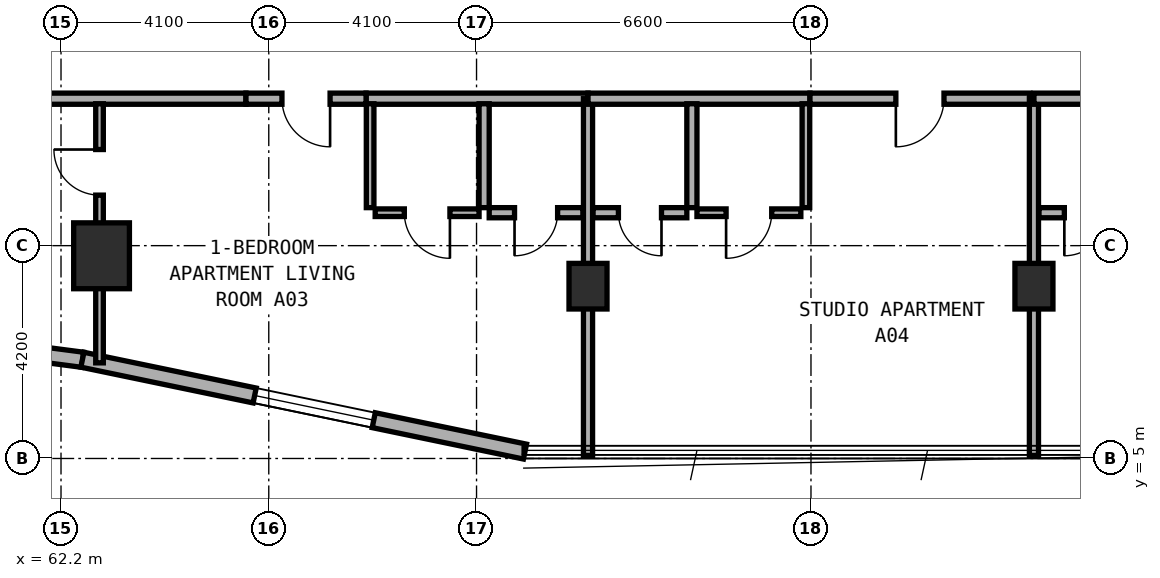
"""IFC4 building model, lengths in metres.
Left out: names, types, materials, properties, quantities, classifications, styles, units other than length and angle.
Written with IfcOpenShell. Run it as: python <this file> out.ifc"""

import sys

from ifc_helpers import new_model, si_unit, direction, frame, frame_2d, origin, origin_2d, place, context, subcontext, project, spatial, rectangle, extrude, element, fill, save


model = new_model("IFC4")
c1 = context("Model", 3, precision=1e-05, world=origin(), true_north=direction((0.0, 1.0)))
c2 = subcontext(c1, "Body", "Model", "MODEL_VIEW")
j1 = project(units=[si_unit("LENGTHUNIT", "METRE"), si_unit("PLANEANGLEUNIT", "RADIAN")], contexts=[c1])
p1 = place(None, origin())
s1 = spatial("IfcSite", under=j1, at=p1, CompositionType="ELEMENT")
p2 = place(p1, origin())
s2 = spatial("IfcBuilding", under=s1, at=p2, CompositionType="ELEMENT")
p3 = place(p2, frame((0.0, 0.0, 52.0)))
s3 = spatial("IfcBuildingStorey", under=s2, at=p3, CompositionType="ELEMENT", Elevation=52.0)
for number, where, z_axis, x_axis in (
    (1, (72.6, 8.4, 0.0), (0.0, 0.0, 1.0), (1.0, 0.0, 0.0)),
    (2, (81.4, 8.4, 0.0), (0.0, 0.0, 1.0), (1.0, 0.0, 0.0)),
):
    element("IfcColumn", number, at=place(p3, frame(where, z_axis=z_axis, x_axis=x_axis)), inside=s3, PredefinedType="COLUMN", context=c2, shape_type="SweptSolid", body=[
        extrude(rectangle(XDim=0.75, YDim=0.9, at=origin_2d()), origin(), (0.0, 0.0, 1.0), 3.5),
    ])
p4 = place(p3, frame((63.0, 9.0, 0.0), z_axis=(0.0, 0.0, 1.0), x_axis=(1.0, 0.0, 0.0)))
e3 = element("IfcColumn", 3, at=p4, inside=s3, PredefinedType="COLUMN", context=c2, shape_type="SweptSolid", body=[
    extrude(rectangle(XDim=1.1, YDim=1.3, at=origin_2d()), origin(), (0.0, 0.0, 1.0), 3.5),
])
p5 = place(p3, frame((61.869, 7.047, 0.0), z_axis=(0.0, 0.0, 1.0), x_axis=(0.991559404866, -0.129653178221, 0.0)))
e4 = element("IfcWall", 4, at=p5, inside=s3, PredefinedType="STANDARD", context=c2, shape_type="SweptSolid", body=[
    extrude(rectangle(XDim=0.764, YDim=0.3, at=frame_2d((0.382, 0.0))), origin(), (0.0, 0.0, 1.0), 3.25),
])
p6 = place(p3, frame((62.622, 6.949, 0.0), z_axis=(0.0, 0.0, 1.0), x_axis=(0.979127260729, -0.203248142175, 0.0)))
e5 = element("IfcWall", 5, at=p6, inside=s3, PredefinedType="STANDARD", context=c2, shape_type="SweptSolid", body=[
    extrude(rectangle(XDim=8.92, YDim=0.3, at=frame_2d((4.46, 0.0))), origin(), (0.0, 0.0, 1.0), 3.25),
])
p7 = place(p6, frame((3.472, 0.0, 0.8)))
e6 = element("IfcOpeningElement", 6, at=p7, cuts=e5, PredefinedType="OPENING", context=c2, shape_type="SweptSolid", body=[
    extrude(rectangle(XDim=2.4, YDim=1.6, at=frame_2d((1.2, 0.8))), frame((0.0, 0.16, 0.0), z_axis=(0.0, -1.0, 0.0), x_axis=(1.0, 0.0, 0.0)), (0.0, 0.0, 1.0), 0.32),
])
p8 = place(p3, frame((58.16, 12.1, 0.0), z_axis=(0.0, 0.0, 1.0), x_axis=(1.0, 0.0, 0.0)))
e7 = element("IfcWall", 7, at=p8, inside=s3, PredefinedType="SOLIDWALL", context=c2, shape_type="SweptSolid", body=[
    extrude(rectangle(XDim=7.69, YDim=0.22, at=frame_2d((3.845, 0.0))), origin(), (0.0, 0.0, 1.0), 2.865),
])
p9 = place(p3, frame((68.22, 12.1, 0.0), z_axis=(0.0, 0.0, 1.0), x_axis=(1.0, 0.0, 0.0)))
e8 = element("IfcWall", 8, at=p9, inside=s3, PredefinedType="SOLIDWALL", context=c2, shape_type="SweptSolid", body=[
    extrude(rectangle(XDim=4.38, YDim=0.22, at=frame_2d((2.19, 0.0))), origin(), (0.0, 0.0, 1.0), 2.725),
])
p10 = place(p3, frame((65.85, 12.1, 0.0), z_axis=(0.0, 0.0, 1.0), x_axis=(1.0, 0.0, 0.0)))
e9 = element("IfcWall", 9, at=p10, inside=s3, PredefinedType="SOLIDWALL", context=c2, shape_type="SweptSolid", body=[
    extrude(rectangle(XDim=2.37, YDim=0.22, at=frame_2d((1.185, 0.0))), origin(), (0.0, 0.0, 1.0), 3.22),
])
p11 = place(p10, frame((0.71, 0.0, 0.0)))
e10 = element("IfcOpeningElement", 10, at=p11, cuts=e9, PredefinedType="OPENING", context=c2, shape_type="SweptSolid", body=[
    extrude(rectangle(XDim=0.95, YDim=2.1, at=frame_2d((0.475, 1.05))), frame((0.0, 0.12, 0.0), z_axis=(0.0, -1.0, 0.0), x_axis=(1.0, 0.0, 0.0)), (0.0, 0.0, 1.0), 0.24),
])
p12 = place(p3, frame((62.96, 6.887, 0.0), z_axis=(0.0, 0.0, 1.0), x_axis=(0.0, 1.0, 0.0)))
e11 = element("IfcWall", 11, at=p12, inside=s3, PredefinedType="PARTITIONING", context=c2, shape_type="SweptSolid", body=[
    extrude(rectangle(XDim=5.113, YDim=0.15, at=frame_2d((2.557, 0.0))), origin(), (0.0, 0.0, 1.0), 2.865),
])
p13 = place(p12, frame((3.31, 0.0, 0.0)))
e12 = element("IfcOpeningElement", 12, at=p13, cuts=e11, PredefinedType="OPENING", context=c2, shape_type="SweptSolid", body=[
    extrude(rectangle(XDim=0.9, YDim=2.1, at=frame_2d((0.45, 1.05))), frame((0.0, 0.085, 0.0), z_axis=(0.0, -1.0, 0.0), x_axis=(1.0, 0.0, 0.0)), (0.0, 0.0, 1.0), 0.17),
])
p14 = place(p3, frame((70.55, 9.95, 0.0), z_axis=(0.0, 0.0, 1.0), x_axis=(0.0, 1.0, 0.0)))
e13 = element("IfcWall", 13, at=p14, inside=s3, PredefinedType="PLUMBINGWALL", context=c2, shape_type="SweptSolid", body=[
    extrude(rectangle(XDim=2.05, YDim=0.2, at=frame_2d((1.025, 0.0))), origin(), (0.0, 0.0, 1.0), 3.22),
])
p15 = place(p3, frame((68.3, 9.95, 0.0), z_axis=(0.0, 0.0, 1.0), x_axis=(0.0, 1.0, 0.0)))
e14 = element("IfcWall", 14, at=p15, inside=s3, PredefinedType="PARTITIONING", context=c2, shape_type="SweptSolid", body=[
    extrude(rectangle(XDim=2.05, YDim=0.15, at=frame_2d((1.025, 0.0))), origin(), (0.0, 0.0, 1.0), 3.22),
])
p16 = place(p3, frame((70.65, 9.85, 0.0), z_axis=(0.0, 0.0, 1.0), x_axis=(1.0, 0.0, 0.0)))
e15 = element("IfcWall", 15, at=p16, inside=s3, PredefinedType="PLUMBINGWALL", context=c2, shape_type="SweptSolid", body=[
    extrude(rectangle(XDim=1.85, YDim=0.2, at=frame_2d((0.925, 0.0))), origin(), (0.0, 0.0, 1.0), 3.22),
])
p17 = place(p16, frame((0.5, 0.0, 0.0)))
e16 = element("IfcOpeningElement", 16, at=p17, cuts=e15, PredefinedType="OPENING", context=c2, shape_type="SweptSolid", body=[
    extrude(rectangle(XDim=0.85, YDim=2.1, at=frame_2d((0.425, 1.05))), frame((0.0, 0.11, 0.0), z_axis=(0.0, -1.0, 0.0), x_axis=(1.0, 0.0, 0.0)), (0.0, 0.0, 1.0), 0.22),
])
p18 = place(p3, frame((68.4, 9.85, 0.0), z_axis=(0.0, 0.0, 1.0), x_axis=(1.0, 0.0, 0.0)))
e17 = element("IfcWall", 17, at=p18, inside=s3, PredefinedType="PARTITIONING", context=c2, shape_type="SweptSolid", body=[
    extrude(rectangle(XDim=2.05, YDim=0.15, at=frame_2d((1.025, 0.0))), origin(), (0.0, 0.0, 1.0), 3.22),
])
p19 = place(p18, frame((0.575, 0.0, 0.0)))
e18 = element("IfcOpeningElement", 18, at=p19, cuts=e17, PredefinedType="OPENING", context=c2, shape_type="SweptSolid", body=[
    extrude(rectangle(XDim=0.9, YDim=2.1, at=frame_2d((0.45, 1.05))), frame((0.0, 0.085, 0.0), z_axis=(0.0, -1.0, 0.0), x_axis=(1.0, 0.0, 0.0)), (0.0, 0.0, 1.0), 0.17),
])
p20 = place(p3, frame((72.6, 5.06, 0.0), z_axis=(0.0, 0.0, 1.0), x_axis=(0.0, 1.0, 0.0)))
e19 = element("IfcWall", 19, at=p20, inside=s3, PredefinedType="SOLIDWALL", context=c2, shape_type="SweptSolid", body=[
    extrude(rectangle(XDim=7.04, YDim=0.18, at=frame_2d((3.52, 0.0))), origin(), (0.0, 0.0, 1.0), 2.725),
])
p21 = place(p3, frame((72.6, 12.1, 0.0), z_axis=(0.0, 0.0, 1.0), x_axis=(1.0, 0.0, 0.0)))
e20 = element("IfcWall", 20, at=p21, inside=s3, PredefinedType="SOLIDWALL", context=c2, shape_type="SweptSolid", body=[
    extrude(rectangle(XDim=4.38, YDim=0.22, at=frame_2d((2.19, 0.0))), origin(), (0.0, 0.0, 1.0), 2.725),
])
p22 = place(p3, frame((76.98, 12.1, 0.0), z_axis=(0.0, 0.0, 1.0), x_axis=(1.0, 0.0, 0.0)))
e21 = element("IfcWall", 21, at=p22, inside=s3, PredefinedType="SOLIDWALL", context=c2, shape_type="SweptSolid", body=[
    extrude(rectangle(XDim=4.34, YDim=0.22, at=frame_2d((2.17, 0.0))), origin(), (0.0, 0.0, 1.0), 2.725),
])
p23 = place(p22, frame((1.695, 0.0, 0.0)))
e22 = element("IfcOpeningElement", 22, at=p23, cuts=e21, PredefinedType="OPENING", context=c2, shape_type="SweptSolid", body=[
    extrude(rectangle(XDim=0.95, YDim=2.1, at=frame_2d((0.475, 1.05))), frame((0.0, 0.12, 0.0), z_axis=(0.0, -1.0, 0.0), x_axis=(1.0, 0.0, 0.0)), (0.0, 0.0, 1.0), 0.24),
])
p24 = place(p3, frame((74.65, 9.95, 0.0), z_axis=(0.0, 0.0, 1.0), x_axis=(0.0, 1.0, 0.0)))
e23 = element("IfcWall", 23, at=p24, inside=s3, PredefinedType="PLUMBINGWALL", context=c2, shape_type="SweptSolid", body=[
    extrude(rectangle(XDim=2.05, YDim=0.2, at=frame_2d((1.025, 0.0))), origin(), (0.0, 0.0, 1.0), 2.775),
])
p25 = place(p3, frame((76.9, 9.95, 0.0), z_axis=(0.0, 0.0, 1.0), x_axis=(0.0, 1.0, 0.0)))
e24 = element("IfcWall", 24, at=p25, inside=s3, PredefinedType="PARTITIONING", context=c2, shape_type="SweptSolid", body=[
    extrude(rectangle(XDim=2.05, YDim=0.15, at=frame_2d((1.025, 0.0))), origin(), (0.0, 0.0, 1.0), 2.775),
])
p26 = place(p3, frame((72.7, 9.85, 0.0), z_axis=(0.0, 0.0, 1.0), x_axis=(1.0, 0.0, 0.0)))
e25 = element("IfcWall", 25, at=p26, inside=s3, PredefinedType="PLUMBINGWALL", context=c2, shape_type="SweptSolid", body=[
    extrude(rectangle(XDim=1.85, YDim=0.2, at=frame_2d((0.925, 0.0))), origin(), (0.0, 0.0, 1.0), 3.22),
])
p27 = place(p26, frame((0.5, 0.0, 0.0)))
e26 = element("IfcOpeningElement", 26, at=p27, cuts=e25, PredefinedType="OPENING", context=c2, shape_type="SweptSolid", body=[
    extrude(rectangle(XDim=0.85, YDim=2.1, at=frame_2d((0.425, 1.05))), frame((0.0, 0.11, 0.0), z_axis=(0.0, -1.0, 0.0), x_axis=(1.0, 0.0, 0.0)), (0.0, 0.0, 1.0), 0.22),
])
p28 = place(p3, frame((74.75, 9.85, 0.0), z_axis=(0.0, 0.0, 1.0), x_axis=(1.0, 0.0, 0.0)))
e27 = element("IfcWall", 27, at=p28, inside=s3, PredefinedType="PARTITIONING", context=c2, shape_type="SweptSolid", body=[
    extrude(rectangle(XDim=2.05, YDim=0.15, at=frame_2d((1.025, 0.0))), origin(), (0.0, 0.0, 1.0), 3.22),
])
p29 = place(p28, frame((0.575, 0.0, 0.0)))
e28 = element("IfcOpeningElement", 28, at=p29, cuts=e27, PredefinedType="OPENING", context=c2, shape_type="SweptSolid", body=[
    extrude(rectangle(XDim=0.9, YDim=2.1, at=frame_2d((0.45, 1.05))), frame((0.0, 0.085, 0.0), z_axis=(0.0, -1.0, 0.0), x_axis=(1.0, 0.0, 0.0)), (0.0, 0.0, 1.0), 0.17),
])
p30 = place(p3, frame((81.4, 5.06, 0.0), z_axis=(0.0, 0.0, 1.0), x_axis=(0.0, 1.0, 0.0)))
e29 = element("IfcWall", 29, at=p30, inside=s3, PredefinedType="SOLIDWALL", context=c2, shape_type="SweptSolid", body=[
    extrude(rectangle(XDim=7.04, YDim=0.18, at=frame_2d((3.52, 0.0))), origin(), (0.0, 0.0, 1.0), 2.725),
])
p31 = place(p3, frame((81.4, 12.1, 0.0), z_axis=(0.0, 0.0, 1.0), x_axis=(1.0, 0.0, 0.0)))
e30 = element("IfcWall", 30, at=p31, inside=s3, PredefinedType="SOLIDWALL", context=c2, shape_type="SweptSolid", body=[
    extrude(rectangle(XDim=4.38, YDim=0.22, at=frame_2d((2.19, 0.0))), origin(), (0.0, 0.0, 1.0), 2.725),
])
p32 = place(p3, frame((81.5, 9.85, 0.0), z_axis=(0.0, 0.0, 1.0), x_axis=(1.0, 0.0, 0.0)))
e31 = element("IfcWall", 31, at=p32, inside=s3, PredefinedType="PLUMBINGWALL", context=c2, shape_type="SweptSolid", body=[
    extrude(rectangle(XDim=1.85, YDim=0.2, at=frame_2d((0.925, 0.0))), origin(), (0.0, 0.0, 1.0), 2.725),
])
p33 = place(p32, frame((0.5, 0.0, 0.0)))
e32 = element("IfcOpeningElement", 32, at=p33, cuts=e31, PredefinedType="OPENING", context=c2, shape_type="SweptSolid", body=[
    extrude(rectangle(XDim=0.85, YDim=2.1, at=frame_2d((0.425, 1.05))), frame((0.0, 0.11, 0.0), z_axis=(0.0, -1.0, 0.0), x_axis=(1.0, 0.0, 0.0)), (0.0, 0.0, 1.0), 0.22),
])
p34 = place(p7, origin())
e33 = element("IfcWindow", 33, at=p34, inside=s3, PartitioningType="SINGLE_PANEL", PredefinedType="WINDOW", context=c2, shape_type="SweptSolid", body=[
    extrude(rectangle(XDim=2.4, YDim=1.6, at=frame_2d((1.2, 0.8))), frame((0.0, 0.03, 0.0), z_axis=(0.0, -1.0, 0.0), x_axis=(1.0, 0.0, 0.0)), (0.0, 0.0, 1.0), 0.06),
])
fill(e6, e33)
p35 = place(p11, frame((0.95, 0.0, 0.0), z_axis=(0.0, 0.0, 1.0), x_axis=(-1.0, 0.0, 0.0)))
e34 = element("IfcDoor", 34, at=p35, inside=s3, OperationType="SINGLE_SWING_LEFT", PredefinedType="DOOR", context=c2, shape_type="SweptSolid", body=[
    extrude(rectangle(XDim=0.95, YDim=2.1, at=frame_2d((0.475, 1.05))), frame((0.0, 0.025, 0.0), z_axis=(0.0, -1.0, 0.0), x_axis=(1.0, 0.0, 0.0)), (0.0, 0.0, 1.0), 0.05),
])
fill(e10, e34)
p36 = place(p13, origin())
e35 = element("IfcDoor", 35, at=p36, inside=s3, OperationType="SINGLE_SWING_RIGHT", PredefinedType="DOOR", context=c2, shape_type="SweptSolid", body=[
    extrude(rectangle(XDim=0.9, YDim=2.1, at=frame_2d((0.45, 1.05))), frame((0.0, 0.025, 0.0), z_axis=(0.0, -1.0, 0.0), x_axis=(1.0, 0.0, 0.0)), (0.0, 0.0, 1.0), 0.05),
])
fill(e12, e35)
p37 = place(p17, frame((0.85, 0.0, 0.0), z_axis=(0.0, 0.0, 1.0), x_axis=(-1.0, 0.0, 0.0)))
e36 = element("IfcDoor", 36, at=p37, inside=s3, OperationType="SINGLE_SWING_RIGHT", PredefinedType="DOOR", context=c2, shape_type="SweptSolid", body=[
    extrude(rectangle(XDim=0.85, YDim=2.1, at=frame_2d((0.425, 1.05))), frame((0.0, 0.025, 0.0), z_axis=(0.0, -1.0, 0.0), x_axis=(1.0, 0.0, 0.0)), (0.0, 0.0, 1.0), 0.05),
])
fill(e16, e36)
p38 = place(p19, frame((0.9, 0.0, 0.0), z_axis=(0.0, 0.0, 1.0), x_axis=(-1.0, 0.0, 0.0)))
e37 = element("IfcDoor", 37, at=p38, inside=s3, OperationType="SINGLE_SWING_LEFT", PredefinedType="DOOR", context=c2, shape_type="SweptSolid", body=[
    extrude(rectangle(XDim=0.9, YDim=2.1, at=frame_2d((0.45, 1.05))), frame((0.0, 0.025, 0.0), z_axis=(0.0, -1.0, 0.0), x_axis=(1.0, 0.0, 0.0)), (0.0, 0.0, 1.0), 0.05),
])
fill(e18, e37)
p39 = place(p23, frame((0.95, 0.0, 0.0), z_axis=(0.0, 0.0, 1.0), x_axis=(-1.0, 0.0, 0.0)))
e38 = element("IfcDoor", 38, at=p39, inside=s3, OperationType="SINGLE_SWING_RIGHT", PredefinedType="DOOR", context=c2, shape_type="SweptSolid", body=[
    extrude(rectangle(XDim=0.95, YDim=2.1, at=frame_2d((0.475, 1.05))), frame((0.0, 0.025, 0.0), z_axis=(0.0, -1.0, 0.0), x_axis=(1.0, 0.0, 0.0)), (0.0, 0.0, 1.0), 0.05),
])
fill(e22, e38)
p40 = place(p27, frame((0.85, 0.0, 0.0), z_axis=(0.0, 0.0, 1.0), x_axis=(-1.0, 0.0, 0.0)))
e39 = element("IfcDoor", 39, at=p40, inside=s3, OperationType="SINGLE_SWING_LEFT", PredefinedType="DOOR", context=c2, shape_type="SweptSolid", body=[
    extrude(rectangle(XDim=0.85, YDim=2.1, at=frame_2d((0.425, 1.05))), frame((0.0, 0.025, 0.0), z_axis=(0.0, -1.0, 0.0), x_axis=(1.0, 0.0, 0.0)), (0.0, 0.0, 1.0), 0.05),
])
fill(e26, e39)
p41 = place(p29, frame((0.9, 0.0, 0.0), z_axis=(0.0, 0.0, 1.0), x_axis=(-1.0, 0.0, 0.0)))
e40 = element("IfcDoor", 40, at=p41, inside=s3, OperationType="SINGLE_SWING_RIGHT", PredefinedType="DOOR", context=c2, shape_type="SweptSolid", body=[
    extrude(rectangle(XDim=0.9, YDim=2.1, at=frame_2d((0.45, 1.05))), frame((0.0, 0.025, 0.0), z_axis=(0.0, -1.0, 0.0), x_axis=(1.0, 0.0, 0.0)), (0.0, 0.0, 1.0), 0.05),
])
fill(e28, e40)
p42 = place(p33, frame((0.85, 0.0, 0.0), z_axis=(0.0, 0.0, 1.0), x_axis=(-1.0, 0.0, 0.0)))
e41 = element("IfcDoor", 41, at=p42, inside=s3, OperationType="SINGLE_SWING_RIGHT", PredefinedType="DOOR", context=c2, shape_type="SweptSolid", body=[
    extrude(rectangle(XDim=0.85, YDim=2.1, at=frame_2d((0.425, 1.05))), frame((0.0, 0.025, 0.0), z_axis=(0.0, -1.0, 0.0), x_axis=(1.0, 0.0, 0.0)), (0.0, 0.0, 1.0), 0.05),
])
fill(e32, e41)
save(model, sys.argv[1])
